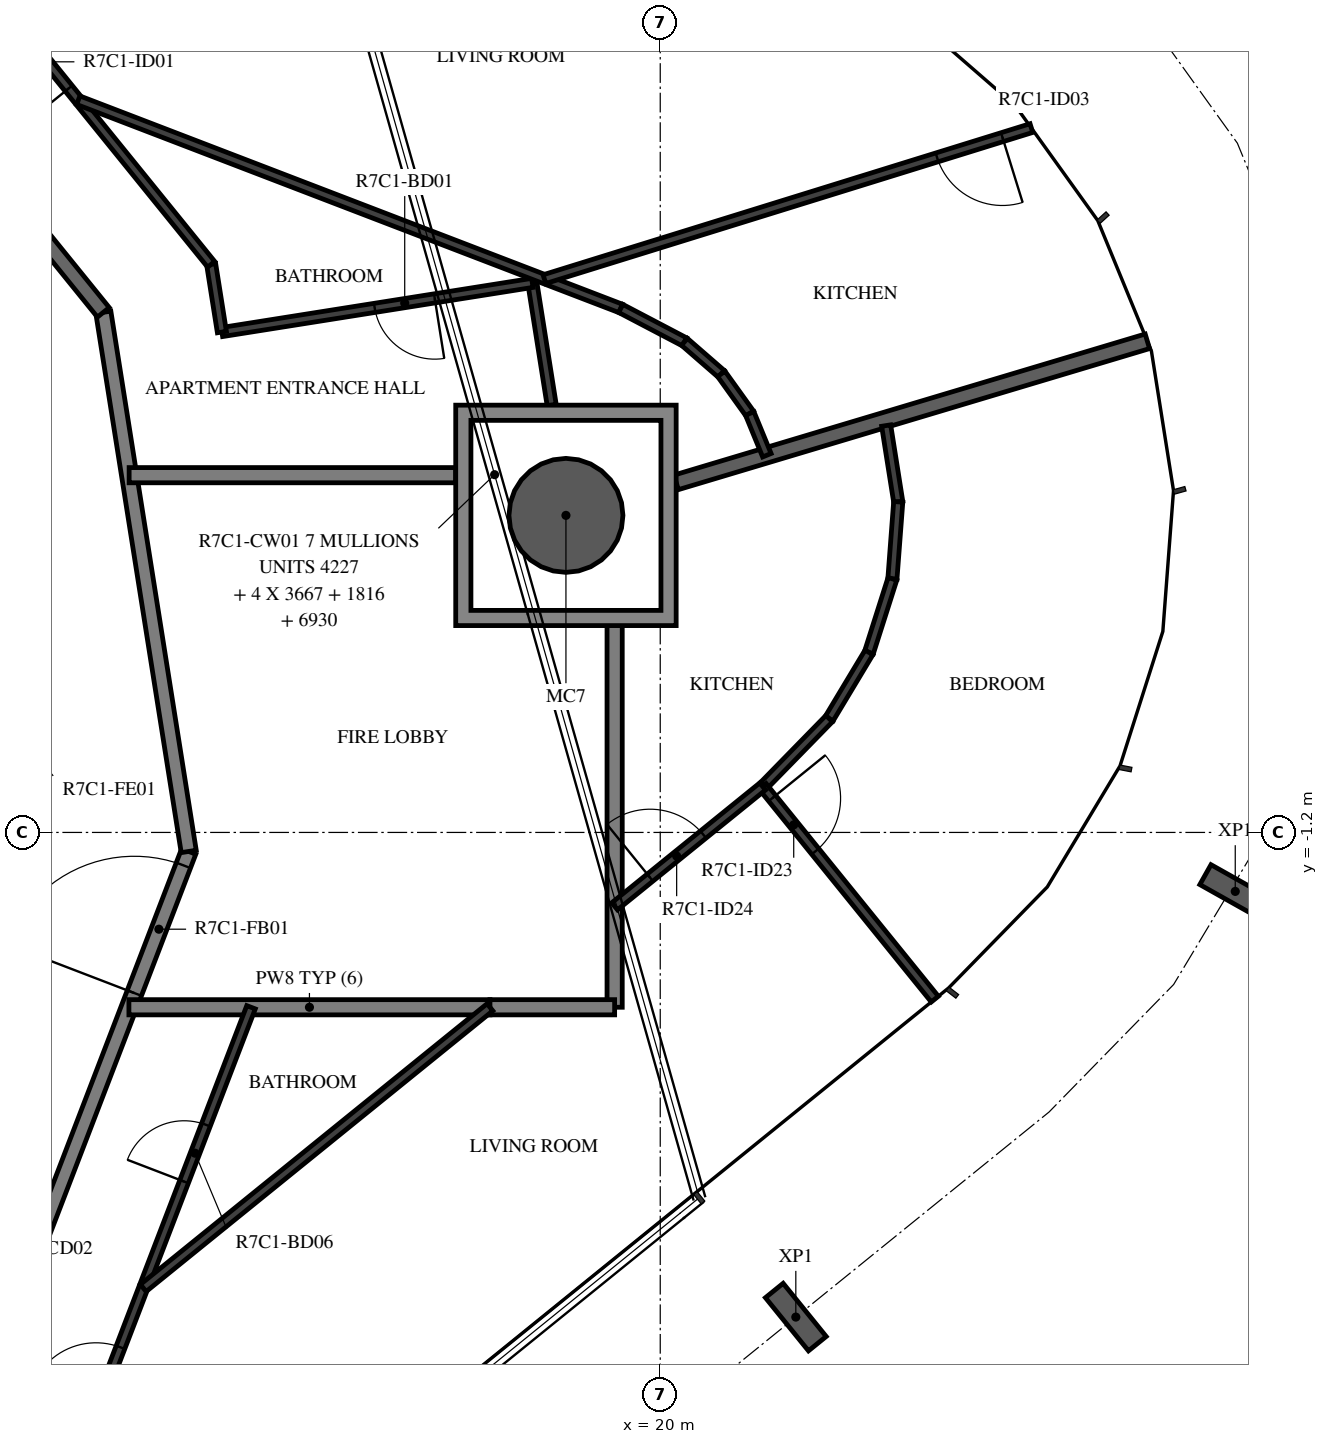
"""IFC4 building model, lengths in metres.
Left out: names, types, materials, properties, quantities, classifications, styles, units other than length and angle.
Written with IfcOpenShell. Run it as: python <this file> out.ifc"""

import sys

from ifc_helpers import new_model, si_unit, direction, frame, frame_2d, origin, origin_2d, place, context, subcontext, project, spatial, polyline, rectangle, hollow_circle, i_section, outline, extrude, element, fill, save


model = new_model("IFC4")
c1 = context("Model", 3, precision=1e-05, world=origin(), true_north=direction((0.0, 1.0)))
c2 = subcontext(c1, "Body", "Model", "MODEL_VIEW")
j1 = project(units=[si_unit("LENGTHUNIT", "METRE"), si_unit("PLANEANGLEUNIT", "RADIAN")], contexts=[c1])
p1 = place(None, origin())
s1 = spatial("IfcSite", under=j1, at=p1, CompositionType="ELEMENT")
p2 = place(p1, origin())
s2 = spatial("IfcBuilding", under=s1, at=p2, CompositionType="ELEMENT")
p3 = place(p2, frame((0.0, 0.0, 287.9)))
s3 = spatial("IfcBuildingStorey", under=s2, at=p3, CompositionType="ELEMENT", Elevation=287.9)
p4 = place(p3, frame((18.76, 2.971, -0.38), z_axis=(0.0, 0.0, 1.0), x_axis=(1.0, 0.0, 0.0)))
e1 = element("IfcColumn", 1, at=p4, inside=s3, PredefinedType="COLUMN", context=c2, shape_type="SweptSolid", body=[
    extrude(hollow_circle(Radius=0.75, WallThickness=0.035, at=origin_2d()), origin(), (0.0, 0.0, 1.0), 2.616),
])
for number, where, z_axis, x_axis in (
    (2, (21.784, -7.576, -0.38), (0.0, 0.0, 1.0), (-0.777, -0.629, 0.0)),
    (3, (27.565, -1.976, -0.38), (0.0, 0.0, 1.0), (-0.49, -0.872, 0.0)),
):
    element("IfcColumn", number, at=place(p3, frame(where, z_axis=z_axis, x_axis=x_axis)), inside=s3, PredefinedType="COLUMN", context=c2, shape_type="SweptSolid", body=[
        extrude(i_section(OverallWidth=0.3, OverallDepth=0.9, WebThickness=0.019, FlangeThickness=0.035, FilletRadius=0.03, at=origin_2d()), origin(), (0.0, 0.0, 1.0), 2.616),
    ])
p5 = place(p3, frame((11.223, -8.154, 0.0), z_axis=(0.0, 0.0, 1.0), x_axis=(0.358341090983, 0.93359073609, 0.0)))
e4 = element("IfcWall", 4, at=p5, inside=s3, PredefinedType="STANDARD", context=c2, shape_type="SweptSolid", body=[
    extrude(rectangle(XDim=7.181, YDim=0.2, at=frame_2d((3.59, 0.0))), origin(), (0.0, 0.0, 1.0), 3.05),
])
p6 = place(p5, frame((5.185, 0.0, 0.0)))
e5 = element("IfcOpeningElement", 5, at=p6, cuts=e4, PredefinedType="OPENING", context=c2, shape_type="SweptSolid", body=[
    extrude(rectangle(XDim=1.8, YDim=2.1, at=frame_2d((0.9, 1.05))), frame((0.0, 0.11, 0.0), z_axis=(0.0, -1.0, 0.0), x_axis=(1.0, 0.0, 0.0)), (0.0, 0.0, 1.0), 0.22),
])
p7 = place(p3, frame((13.797, -1.45, 0.0), z_axis=(0.0, 0.0, 1.0), x_axis=(-0.156421704315, 0.987690361611, 0.0)))
e6 = element("IfcWall", 6, at=p7, inside=s3, PredefinedType="STANDARD", context=c2, shape_type="SweptSolid", body=[
    extrude(rectangle(XDim=7.181, YDim=0.2, at=frame_2d((3.591, 0.0))), origin(), (0.0, 0.0, 1.0), 3.05),
])
p8 = place(p3, frame((12.673, 5.643, 0.0), z_axis=(0.0, 0.0, 1.0), x_axis=(-0.629302871585, 0.777160148113, 0.0)))
e7 = element("IfcWall", 7, at=p8, inside=s3, PredefinedType="STANDARD", context=c2, shape_type="SweptSolid", body=[
    extrude(rectangle(XDim=7.181, YDim=0.2, at=frame_2d((3.59, 0.0))), origin(), (0.0, 0.0, 1.0), 3.05),
])
p9 = place(p8, frame((4.1, 0.0, 0.0)))
e8 = element("IfcOpeningElement", 8, at=p9, cuts=e7, PredefinedType="OPENING", context=c2, shape_type="SweptSolid", body=[
    extrude(rectangle(XDim=1.0, YDim=2.1, at=frame_2d((0.5, 1.05))), frame((0.0, 0.11, 0.0), z_axis=(0.0, -1.0, 0.0), x_axis=(1.0, 0.0, 0.0)), (0.0, 0.0, 1.0), 0.22),
])
p10 = place(p3, frame((17.309, 3.5, 0.0), z_axis=(0.0, 0.0, 1.0), x_axis=(-1.0, 0.0, 0.0)))
e9 = element("IfcWall", 9, at=p10, inside=s3, PredefinedType="STANDARD", context=c2, shape_type="SweptSolid", body=[
    extrude(rectangle(XDim=4.297, YDim=0.2, at=frame_2d((2.148, 0.0))), origin(), (0.0, 0.0, 1.0), 3.05),
])
p11 = place(p3, frame((13.01, -3.5, 0.0), z_axis=(0.0, 0.0, 1.0), x_axis=(1.0, 0.0, 0.0)))
e10 = element("IfcWall", 10, at=p11, inside=s3, PredefinedType="STANDARD", context=c2, shape_type="SweptSolid", body=[
    extrude(rectangle(XDim=4.75, YDim=0.2, at=frame_2d((2.375, 0.0))), origin(), (0.0, 0.0, 1.0), 3.05),
])
p12 = place(p3, frame((19.4, -3.5, 0.0), z_axis=(0.0, 0.0, 1.0), x_axis=(0.0, 1.0, 0.0)))
e11 = element("IfcWall", 11, at=p12, inside=s3, PredefinedType="STANDARD", context=c2, shape_type="SweptSolid", body=[
    extrude(rectangle(XDim=5.021, YDim=0.2, at=frame_2d((2.511, 0.0))), origin(), (0.0, 0.0, 1.0), 3.05),
])
p13 = place(p3, frame((17.76, -3.5, 0.0), z_axis=(0.0, 0.0, 1.0), x_axis=(1.0, 0.0, 0.0)))
e12 = element("IfcWall", 12, at=p13, inside=s3, PredefinedType="STANDARD", context=c2, shape_type="SweptSolid", body=[
    extrude(rectangle(XDim=1.64, YDim=0.2, at=frame_2d((0.82, 0.0))), origin(), (0.0, 0.0, 1.0), 3.05),
])
p14 = place(p3, frame((20.209, 3.405, 0.0), z_axis=(0.0, 0.0, 1.0), x_axis=(0.957991224208, 0.286797514529, 0.0)))
e13 = element("IfcWall", 13, at=p14, inside=s3, PredefinedType="STANDARD", context=c2, shape_type="SweptSolid", body=[
    extrude(rectangle(XDim=6.471, YDim=0.2, at=frame_2d((3.236, 0.0))), origin(), (0.0, 0.0, 1.0), 3.05),
])
p15 = place(p3, frame((18.572, 4.421, 0.0), z_axis=(0.0, 0.0, 1.0), x_axis=(-0.156347444306, 0.987702119396, 0.0)))
e14 = element("IfcWall", 14, at=p15, inside=s3, PredefinedType="PARTITIONING", context=c2, shape_type="SweptSolid", body=[
    extrude(rectangle(XDim=1.629, YDim=0.12, at=frame_2d((0.814, 0.0))), origin(), (0.0, 0.0, 1.0), 3.05),
])
p16 = place(p3, frame((18.317, 6.03, 0.0), z_axis=(0.0, 0.0, 1.0), x_axis=(-0.9876848128, -0.156456737039, 0.0)))
e15 = element("IfcWall", 15, at=p16, inside=s3, PredefinedType="PARTITIONING", context=c2, shape_type="SweptSolid", body=[
    extrude(rectangle(XDim=4.135, YDim=0.12, at=frame_2d((2.068, 0.0))), origin(), (0.0, 0.0, 1.0), 3.05),
])
p17 = place(p16, frame((1.3, 0.0, 0.0)))
e16 = element("IfcOpeningElement", 16, at=p17, cuts=e15, PredefinedType="OPENING", context=c2, shape_type="SweptSolid", body=[
    extrude(rectangle(XDim=0.8, YDim=2.1, at=frame_2d((0.4, 1.05))), frame((0.0, 0.07, 0.0), z_axis=(0.0, -1.0, 0.0), x_axis=(1.0, 0.0, 0.0)), (0.0, 0.0, 1.0), 0.14),
])
p18 = place(p3, frame((14.233, 5.383, 0.0), z_axis=(0.0, 0.0, 1.0), x_axis=(-0.156365428504, 0.987699272435, 0.0)))
e17 = element("IfcWall", 17, at=p18, inside=s3, PredefinedType="PARTITIONING", context=c2, shape_type="SweptSolid", body=[
    extrude(rectangle(XDim=0.902, YDim=0.12, at=frame_2d((0.451, 0.0))), origin(), (0.0, 0.0, 1.0), 3.05),
])
p19 = place(p3, frame((14.092, 6.274, 0.0), z_axis=(0.0, 0.0, 1.0), x_axis=(-0.62933367237, 0.777135206268, 0.0)))
e18 = element("IfcWall", 18, at=p19, inside=s3, PredefinedType="PARTITIONING", context=c2, shape_type="SweptSolid", body=[
    extrude(rectangle(XDim=7.985, YDim=0.12, at=frame_2d((3.992, 0.0))), origin(), (0.0, 0.0, 1.0), 3.05),
])
p20 = place(p19, frame((2.978, 0.0, 0.0)))
e19 = element("IfcOpeningElement", 19, at=p20, cuts=e18, PredefinedType="OPENING", context=c2, shape_type="SweptSolid", body=[
    extrude(rectangle(XDim=0.9, YDim=2.1, at=frame_2d((0.45, 1.05))), frame((0.0, 0.07, 0.0), z_axis=(0.0, -1.0, 0.0), x_axis=(1.0, 0.0, 0.0)), (0.0, 0.0, 1.0), 0.14),
])
p21 = place(p19, frame((4.749, 0.0, 0.0)))
e20 = element("IfcOpeningElement", 20, at=p21, cuts=e18, PredefinedType="OPENING", context=c2, shape_type="SweptSolid", body=[
    extrude(rectangle(XDim=0.9, YDim=2.1, at=frame_2d((0.45, 1.05))), frame((0.0, 0.07, 0.0), z_axis=(0.0, -1.0, 0.0), x_axis=(1.0, 0.0, 0.0)), (0.0, 0.0, 1.0), 0.14),
])
p22 = place(p3, frame((12.344, 8.433, 0.0), z_axis=(0.0, 0.0, 1.0), x_axis=(0.933573435176, -0.358386162029, 0.0)))
e21 = element("IfcWall", 21, at=p22, inside=s3, PredefinedType="PARTITIONING", context=c2, shape_type="SweptSolid", body=[
    extrude(rectangle(XDim=7.644, YDim=0.12, at=frame_2d((3.822, 0.0))), origin(), (0.0, 0.0, 1.0), 3.05),
])
p23 = place(p3, frame((19.48, 5.694, 0.0), z_axis=(0.0, 0.0, 1.0), x_axis=(0.885755816688, -0.464151519662, 0.0)))
e22 = element("IfcWall", 22, at=p23, inside=s3, PredefinedType="PARTITIONING", context=c2, shape_type="SweptSolid", body=[
    extrude(rectangle(XDim=0.947, YDim=0.12, at=frame_2d((0.473, 0.0))), origin(), (0.0, 0.0, 1.0), 3.05),
])
p24 = place(p3, frame((20.319, 5.254, 0.0), z_axis=(0.0, 0.0, 1.0), x_axis=(0.754646464307, -0.656131628493, 0.0)))
e23 = element("IfcWall", 23, at=p24, inside=s3, PredefinedType="PARTITIONING", context=c2, shape_type="SweptSolid", body=[
    extrude(rectangle(XDim=0.642, YDim=0.12, at=frame_2d((0.321, 0.0))), origin(), (0.0, 0.0, 1.0), 3.05),
])
p25 = place(p3, frame((20.803, 4.833, 0.0), z_axis=(0.0, 0.0, 1.0), x_axis=(0.583322588112, -0.812240579014, 0.0)))
e24 = element("IfcWall", 24, at=p25, inside=s3, PredefinedType="PARTITIONING", context=c2, shape_type="SweptSolid", body=[
    extrude(rectangle(XDim=0.642, YDim=0.12, at=frame_2d((0.321, 0.0))), origin(), (0.0, 0.0, 1.0), 3.05),
])
p26 = place(p3, frame((21.177, 4.312, 0.0), z_axis=(0.0, 0.0, 1.0), x_axis=(0.379673715705, -0.925120462212, 0.0)))
e25 = element("IfcWall", 25, at=p26, inside=s3, PredefinedType="PARTITIONING", context=c2, shape_type="SweptSolid", body=[
    extrude(rectangle(XDim=0.594, YDim=0.12, at=frame_2d((0.297, 0.0))), origin(), (0.0, 0.0, 1.0), 3.05),
])
p27 = place(p3, frame((24.883, 8.066, 0.0), z_axis=(0.0, 0.0, 1.0), x_axis=(-0.955106049863, -0.296264127958, 0.0)))
e26 = element("IfcWall", 26, at=p27, inside=s3, PredefinedType="PARTITIONING", context=c2, shape_type="SweptSolid", body=[
    extrude(rectangle(XDim=6.708, YDim=0.12, at=frame_2d((3.354, 0.0))), origin(), (0.0, 0.0, 1.0), 3.05),
])
p28 = place(p27, frame((0.4, 0.0, 0.0)))
e27 = element("IfcOpeningElement", 27, at=p28, cuts=e26, PredefinedType="OPENING", context=c2, shape_type="SweptSolid", body=[
    extrude(rectangle(XDim=0.9, YDim=2.1, at=frame_2d((0.45, 1.05))), frame((0.0, 0.07, 0.0), z_axis=(0.0, -1.0, 0.0), x_axis=(1.0, 0.0, 0.0)), (0.0, 0.0, 1.0), 0.14),
])
p29 = place(p3, frame((12.505, -9.001, 0.0), z_axis=(0.0, 0.0, 1.0), x_axis=(0.358373707046, 0.933578216379, 0.0)))
e28 = element("IfcWall", 28, at=p29, inside=s3, PredefinedType="PARTITIONING", context=c2, shape_type="SweptSolid", body=[
    extrude(rectangle(XDim=5.892, YDim=0.12, at=frame_2d((2.946, 0.0))), origin(), (0.0, 0.0, 1.0), 3.05),
])
p30 = place(p29, frame((0.2, 0.0, 0.0)))
e29 = element("IfcOpeningElement", 29, at=p30, cuts=e28, PredefinedType="OPENING", context=c2, shape_type="SweptSolid", body=[
    extrude(rectangle(XDim=0.9, YDim=2.1, at=frame_2d((0.45, 1.05))), frame((0.0, 0.07, 0.0), z_axis=(0.0, -1.0, 0.0), x_axis=(1.0, 0.0, 0.0)), (0.0, 0.0, 1.0), 0.14),
])
p31 = place(p29, frame((3.436, 0.0, 0.0)))
e30 = element("IfcOpeningElement", 30, at=p31, cuts=e28, PredefinedType="OPENING", context=c2, shape_type="SweptSolid", body=[
    extrude(rectangle(XDim=0.8, YDim=2.1, at=frame_2d((0.4, 1.05))), frame((0.0, 0.07, 0.0), z_axis=(0.0, -1.0, 0.0), x_axis=(1.0, 0.0, 0.0)), (0.0, 0.0, 1.0), 0.14),
])
p32 = place(p3, frame((22.972, 4.153, 0.0), z_axis=(0.0, 0.0, 1.0), x_axis=(0.156209385929, -0.987723963336, 0.0)))
e31 = element("IfcWall", 31, at=p32, inside=s3, PredefinedType="PARTITIONING", context=c2, shape_type="SweptSolid", body=[
    extrude(rectangle(XDim=1.016, YDim=0.12, at=frame_2d((0.508, 0.0))), origin(), (0.0, 0.0, 1.0), 3.05),
])
p33 = place(p3, frame((23.131, 3.149, 0.0), z_axis=(0.0, 0.0, 1.0), x_axis=(-0.075446997935, -0.99714981347, 0.0)))
e32 = element("IfcWall", 32, at=p33, inside=s3, PredefinedType="PARTITIONING", context=c2, shape_type="SweptSolid", body=[
    extrude(rectangle(XDim=1.016, YDim=0.12, at=frame_2d((0.508, 0.0))), origin(), (0.0, 0.0, 1.0), 3.05),
])
p34 = place(p3, frame((23.054, 2.136, 0.0), z_axis=(0.0, 0.0, 1.0), x_axis=(-0.303511129679, -0.952827893253, 0.0)))
e33 = element("IfcWall", 33, at=p34, inside=s3, PredefinedType="PARTITIONING", context=c2, shape_type="SweptSolid", body=[
    extrude(rectangle(XDim=1.016, YDim=0.12, at=frame_2d((0.508, 0.0))), origin(), (0.0, 0.0, 1.0), 3.05),
])
p35 = place(p3, frame((22.746, 1.168, 0.0), z_axis=(0.0, 0.0, 1.0), x_axis=(-0.515096534995, -0.857132171626, 0.0)))
e34 = element("IfcWall", 34, at=p35, inside=s3, PredefinedType="PARTITIONING", context=c2, shape_type="SweptSolid", body=[
    extrude(rectangle(XDim=1.016, YDim=0.12, at=frame_2d((0.508, 0.0))), origin(), (0.0, 0.0, 1.0), 3.05),
])
p36 = place(p3, frame((22.223, 0.298, 0.0), z_axis=(0.0, 0.0, 1.0), x_axis=(-0.69880109182, -0.715316037896, 0.0)))
e35 = element("IfcWall", 35, at=p36, inside=s3, PredefinedType="PARTITIONING", context=c2, shape_type="SweptSolid", body=[
    extrude(rectangle(XDim=1.227, YDim=0.12, at=frame_2d((0.614, 0.0))), origin(), (0.0, 0.0, 1.0), 3.05),
])
p37 = place(p3, frame((21.347, -0.595, 0.0), z_axis=(0.0, 0.0, 1.0), x_axis=(0.62934843781, -0.7771232488, 0.0)))
e36 = element("IfcWall", 36, at=p37, inside=s3, PredefinedType="PARTITIONING", context=c2, shape_type="SweptSolid", body=[
    extrude(rectangle(XDim=3.6, YDim=0.12, at=frame_2d((1.8, 0.0))), origin(), (0.0, 0.0, 1.0), 3.05),
])
p38 = place(p37, frame((0.2, 0.0, 0.0)))
e37 = element("IfcOpeningElement", 37, at=p38, cuts=e36, PredefinedType="OPENING", context=c2, shape_type="SweptSolid", body=[
    extrude(rectangle(XDim=0.9, YDim=2.1, at=frame_2d((0.45, 1.05))), frame((0.0, 0.07, 0.0), z_axis=(0.0, -1.0, 0.0), x_axis=(1.0, 0.0, 0.0)), (0.0, 0.0, 1.0), 0.14),
])
p39 = place(p3, frame((19.4, -2.172, 0.0), z_axis=(0.0, 0.0, 1.0), x_axis=(0.777147279935, 0.629318762862, 0.0)))
e38 = element("IfcWall", 38, at=p39, inside=s3, PredefinedType="PARTITIONING", context=c2, shape_type="SweptSolid", body=[
    extrude(rectangle(XDim=2.505, YDim=0.12, at=frame_2d((1.253, 0.0))), origin(), (0.0, 0.0, 1.0), 3.05),
])
p40 = place(p39, frame((0.6, 0.0, 0.0)))
e39 = element("IfcOpeningElement", 39, at=p40, cuts=e38, PredefinedType="OPENING", context=c2, shape_type="SweptSolid", body=[
    extrude(rectangle(XDim=0.9, YDim=2.1, at=frame_2d((0.45, 1.05))), frame((0.0, 0.07, 0.0), z_axis=(0.0, -1.0, 0.0), x_axis=(1.0, 0.0, 0.0)), (0.0, 0.0, 1.0), 0.14),
])
p41 = place(p3, frame((17.76, -3.5, 0.0), z_axis=(0.0, 0.0, 1.0), x_axis=(-0.777133455716, -0.62933583404, 0.0)))
e40 = element("IfcWall", 40, at=p41, inside=s3, PredefinedType="PARTITIONING", context=c2, shape_type="SweptSolid", body=[
    extrude(rectangle(XDim=5.869, YDim=0.12, at=frame_2d((2.935, 0.0))), origin(), (0.0, 0.0, 1.0), 3.05),
])
p42 = place(p3, origin())
e41 = element("IfcWall", 41, at=p42, inside=s3, PredefinedType="STANDARD", context=c2, shape_type="SweptSolid", body=[
    extrude(outline(polyline([(20.209, 4.421), (20.209, 1.521), (17.309, 1.521), (17.309, 4.421), (20.209, 4.421)]), holes=[polyline([(17.51, 1.721), (20.01, 1.721), (20.01, 4.221), (17.51, 4.221), (17.51, 1.721)])]), origin(), (0.0, 0.0, 1.0), 3.05),
])
p43 = place(p17, origin())
e42 = element("IfcDoor", 42, at=p43, inside=s3, OperationType="SINGLE_SWING_LEFT", PredefinedType="DOOR", context=c2, shape_type="SweptSolid", body=[
    extrude(rectangle(XDim=0.8, YDim=2.1, at=frame_2d((0.4, 1.05))), frame((0.0, 0.025, 0.0), z_axis=(0.0, -1.0, 0.0), x_axis=(1.0, 0.0, 0.0)), (0.0, 0.0, 1.0), 0.05),
])
fill(e16, e42)
p44 = place(p20, origin())
e43 = element("IfcDoor", 43, at=p44, inside=s3, OperationType="SINGLE_SWING_LEFT", PredefinedType="DOOR", context=c2, shape_type="SweptSolid", body=[
    extrude(rectangle(XDim=0.9, YDim=2.1, at=frame_2d((0.45, 1.05))), frame((0.0, 0.025, 0.0), z_axis=(0.0, -1.0, 0.0), x_axis=(1.0, 0.0, 0.0)), (0.0, 0.0, 1.0), 0.05),
])
fill(e19, e43)
p45 = place(p28, origin())
e44 = element("IfcDoor", 44, at=p45, inside=s3, OperationType="SINGLE_SWING_LEFT", PredefinedType="DOOR", context=c2, shape_type="SweptSolid", body=[
    extrude(rectangle(XDim=0.9, YDim=2.1, at=frame_2d((0.45, 1.05))), frame((0.0, 0.025, 0.0), z_axis=(0.0, -1.0, 0.0), x_axis=(1.0, 0.0, 0.0)), (0.0, 0.0, 1.0), 0.05),
])
fill(e27, e44)
p46 = place(p30, origin())
e45 = element("IfcDoor", 45, at=p46, inside=s3, OperationType="SINGLE_SWING_RIGHT", PredefinedType="DOOR", context=c2, shape_type="SweptSolid", body=[
    extrude(rectangle(XDim=0.9, YDim=2.1, at=frame_2d((0.45, 1.05))), frame((0.0, 0.025, 0.0), z_axis=(0.0, -1.0, 0.0), x_axis=(1.0, 0.0, 0.0)), (0.0, 0.0, 1.0), 0.05),
])
fill(e29, e45)
p47 = place(p31, origin())
e46 = element("IfcDoor", 46, at=p47, inside=s3, OperationType="SINGLE_SWING_RIGHT", PredefinedType="DOOR", context=c2, shape_type="SweptSolid", body=[
    extrude(rectangle(XDim=0.8, YDim=2.1, at=frame_2d((0.4, 1.05))), frame((0.0, 0.025, 0.0), z_axis=(0.0, -1.0, 0.0), x_axis=(1.0, 0.0, 0.0)), (0.0, 0.0, 1.0), 0.05),
])
fill(e30, e46)
p48 = place(p38, origin())
e47 = element("IfcDoor", 47, at=p48, inside=s3, OperationType="SINGLE_SWING_RIGHT", PredefinedType="DOOR", context=c2, shape_type="SweptSolid", body=[
    extrude(rectangle(XDim=0.9, YDim=2.1, at=frame_2d((0.45, 1.05))), frame((0.0, 0.025, 0.0), z_axis=(0.0, -1.0, 0.0), x_axis=(1.0, 0.0, 0.0)), (0.0, 0.0, 1.0), 0.05),
])
fill(e37, e47)
p49 = place(p40, origin())
e48 = element("IfcDoor", 48, at=p49, inside=s3, OperationType="SINGLE_SWING_LEFT", PredefinedType="DOOR", context=c2, shape_type="SweptSolid", body=[
    extrude(rectangle(XDim=0.9, YDim=2.1, at=frame_2d((0.45, 1.05))), frame((0.0, 0.025, 0.0), z_axis=(0.0, -1.0, 0.0), x_axis=(1.0, 0.0, 0.0)), (0.0, 0.0, 1.0), 0.05),
])
fill(e39, e48)
p50 = place(p6, origin())
e49 = element("IfcDoor", 49, at=p50, inside=s3, OperationType="DOUBLE_DOOR_SINGLE_SWING", PredefinedType="DOOR", context=c2, shape_type="SweptSolid", body=[
    extrude(rectangle(XDim=1.8, YDim=2.1, at=frame_2d((0.9, 1.05))), frame((0.0, 0.025, 0.0), z_axis=(0.0, -1.0, 0.0), x_axis=(1.0, 0.0, 0.0)), (0.0, 0.0, 1.0), 0.05),
])
fill(e5, e49)
save(model, sys.argv[1])
